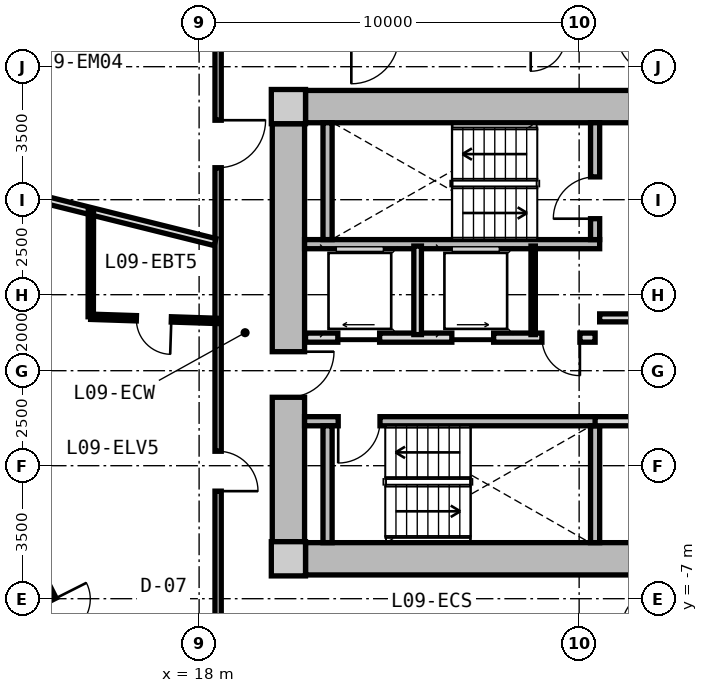
"""IFC4 building model, lengths in metres.
Left out: names, types, materials, properties, quantities, classifications, styles, units other than length and angle.
Written with IfcOpenShell. Run it as: python <this file> out.ifc"""

import sys

from ifc_helpers import new_model, si_unit, direction, frame, frame_2d, origin, origin_2d, place, context, subcontext, project, spatial, rectangle, extrude, source, transform, mapped, element, fill, save


model = new_model("IFC4")
c1 = context("Model", 3, precision=1e-05, world=origin(), true_north=direction((0.0, 1.0)))
c2 = subcontext(c1, "Body", "Model", "MODEL_VIEW")
j1 = project(units=[si_unit("LENGTHUNIT", "METRE"), si_unit("PLANEANGLEUNIT", "RADIAN")], contexts=[c1])
p1 = place(None, origin())
s1 = spatial("IfcSite", under=j1, at=p1, CompositionType="ELEMENT")
p2 = place(p1, origin())
s2 = spatial("IfcBuilding", under=s1, at=p2, CompositionType="ELEMENT")
p3 = place(p2, frame((0.0, 0.0, 33.8)))
s3 = spatial("IfcBuildingStorey", under=s2, at=p3, CompositionType="ELEMENT", Elevation=33.8)
m1 = source(origin(), c2, "Body", "SweptSolid", [
    extrude(rectangle(XDim=0.9, YDim=0.9, at=origin_2d()), origin(), (0.0, 0.0, 1.0), 3.05),
])
for number, where, z_axis, x_axis in (
    (1, (20.35, -5.95, 0.0), (0.0, 0.0, 1.0), (1.0, 0.0, 0.0)),
    (2, (20.35, 5.95, 0.0), (0.0, 0.0, 1.0), (1.0, 0.0, 0.0)),
):
    element("IfcColumn", number, at=place(p3, frame(where, z_axis=z_axis, x_axis=x_axis)), inside=s3, PredefinedType="COLUMN", context=c2, shape_type="MappedRepresentation", body=[
        mapped(m1, transform((0.0, 0.0, 0.0), x_axis=(1.0, 0.0, 0.0), y_axis=(0.0, 1.0, 0.0), z_axis=(0.0, 0.0, 1.0), scale=1.0)),
    ])
m2 = source(origin(), c2, "Body", "SweptSolid", [
    extrude(rectangle(XDim=14.4, YDim=0.85, at=frame_2d((7.2, 0.0))), origin(), (0.0, 0.0, 1.0), 2.79),
])
for number, where, z_axis, x_axis in (
    (3, (20.8, 5.95, 0.0), (0.0, 0.0, 1.0), (1.0, 0.0, 0.0)),
    (4, (35.2, -5.95, 0.0), (0.0, 0.0, 1.0), (-1.0, 0.0, 0.0)),
):
    element("IfcWall", number, at=place(p3, frame(where, z_axis=z_axis, x_axis=x_axis)), inside=s3, PredefinedType="SHEAR", context=c2, shape_type="MappedRepresentation", body=[
        mapped(m2, transform((0.0, 0.0, 0.0), x_axis=(1.0, 0.0, 0.0), y_axis=(0.0, 1.0, 0.0), z_axis=(0.0, 0.0, 1.0), scale=1.0)),
    ])
m3 = source(origin(), c2, "Body", "SweptSolid", [
    extrude(rectangle(XDim=11.0, YDim=0.85, at=frame_2d((5.5, 0.0))), origin(), (0.0, 0.0, 1.0), 2.79),
])
p4 = place(p3, frame((20.35, -5.5, 0.0), z_axis=(0.0, 0.0, 1.0), x_axis=(0.0, 1.0, 0.0)))
e5 = element("IfcWall", 5, at=p4, inside=s3, PredefinedType="SHEAR", context=c2, shape_type="MappedRepresentation", body=[
    mapped(m3, transform((0.0, 0.0, 0.0), x_axis=(1.0, 0.0, 0.0), y_axis=(0.0, 1.0, 0.0), z_axis=(0.0, 0.0, 1.0), scale=1.0)),
])
p5 = place(p4, frame((3.8, 0.0, 0.0)))
e6 = element("IfcOpeningElement", 6, at=p5, cuts=e5, PredefinedType="OPENING", context=c2, shape_type="SweptSolid", body=[
    extrude(rectangle(XDim=1.2, YDim=2.15, at=frame_2d((0.6, 1.075))), frame((0.0, 0.435, 0.0), z_axis=(0.0, -1.0, 0.0), x_axis=(1.0, 0.0, 0.0)), (0.0, 0.0, 1.0), 0.87),
])
m4 = source(origin(), c2, "Body", "SweptSolid", [
    extrude(rectangle(XDim=7.765, YDim=0.24, at=frame_2d((3.883, 0.0))), origin(), (0.0, 0.0, 1.0), 2.79),
])
p6 = place(p3, frame((20.775, 2.33, 0.0), z_axis=(0.0, 0.0, 1.0), x_axis=(1.0, 0.0, 0.0)))
e7 = element("IfcWall", 7, at=p6, inside=s3, PredefinedType="PARTITIONING", context=c2, shape_type="MappedRepresentation", body=[
    mapped(m4, transform((0.0, 0.0, 0.0), x_axis=(1.0, 0.0, 0.0), y_axis=(0.0, 1.0, 0.0), z_axis=(0.0, 0.0, 1.0), scale=1.0)),
])
m5 = source(origin(), c2, "Body", "SweptSolid", [
    extrude(rectangle(XDim=3.075, YDim=0.24, at=frame_2d((1.538, 0.0))), origin(), (0.0, 0.0, 1.0), 2.79),
])
p7 = place(p3, frame((21.38, 2.45, 0.0), z_axis=(0.0, 0.0, 1.0), x_axis=(0.0, 1.0, 0.0)))
e8 = element("IfcWall", 8, at=p7, inside=s3, PredefinedType="PARTITIONING", context=c2, shape_type="MappedRepresentation", body=[
    mapped(m5, transform((0.0, 0.0, 0.0), x_axis=(1.0, 0.0, 0.0), y_axis=(0.0, 1.0, 0.0), z_axis=(0.0, 0.0, 1.0), scale=1.0)),
])
p8 = place(p3, frame((28.42, 2.45, 0.0), z_axis=(0.0, 0.0, 1.0), x_axis=(0.0, 1.0, 0.0)))
e9 = element("IfcWall", 9, at=p8, inside=s3, PredefinedType="PARTITIONING", context=c2, shape_type="MappedRepresentation", body=[
    mapped(m5, transform((0.0, 0.0, 0.0), x_axis=(1.0, 0.0, 0.0), y_axis=(0.0, 1.0, 0.0), z_axis=(0.0, 0.0, 1.0), scale=1.0)),
])
p9 = place(p8, frame((0.55, 0.0, 0.0)))
e10 = element("IfcOpeningElement", 10, at=p9, cuts=e9, PredefinedType="OPENING", context=c2, shape_type="SweptSolid", body=[
    extrude(rectangle(XDim=1.1, YDim=2.15, at=frame_2d((0.55, 1.075))), frame((0.0, 0.13, 0.0), z_axis=(0.0, -1.0, 0.0), x_axis=(1.0, 0.0, 0.0)), (0.0, 0.0, 1.0), 0.26),
])
p10 = place(p3, frame((20.775, -2.33, 0.0), z_axis=(0.0, 0.0, 1.0), x_axis=(1.0, 0.0, 0.0)))
e11 = element("IfcWall", 11, at=p10, inside=s3, PredefinedType="PARTITIONING", context=c2, shape_type="MappedRepresentation", body=[
    mapped(m4, transform((0.0, 0.0, 0.0), x_axis=(1.0, 0.0, 0.0), y_axis=(0.0, 1.0, 0.0), z_axis=(0.0, 0.0, 1.0), scale=1.0)),
])
p11 = place(p10, frame((0.885, 0.0, 0.0)))
e12 = element("IfcOpeningElement", 12, at=p11, cuts=e11, PredefinedType="OPENING", context=c2, shape_type="SweptSolid", body=[
    extrude(rectangle(XDim=1.1, YDim=2.15, at=frame_2d((0.55, 1.075))), frame((0.0, 0.13, 0.0), z_axis=(0.0, -1.0, 0.0), x_axis=(1.0, 0.0, 0.0)), (0.0, 0.0, 1.0), 0.26),
])
for number, where, z_axis, x_axis in (
    (13, (21.38, -5.525, 0.0), (0.0, 0.0, 1.0), (0.0, 1.0, 0.0)),
    (14, (28.42, -5.525, 0.0), (0.0, 0.0, 1.0), (0.0, 1.0, 0.0)),
):
    element("IfcWall", number, at=place(p3, frame(where, z_axis=z_axis, x_axis=x_axis)), inside=s3, PredefinedType="PARTITIONING", context=c2, shape_type="MappedRepresentation", body=[
        mapped(m5, transform((0.0, 0.0, 0.0), x_axis=(1.0, 0.0, 0.0), y_axis=(0.0, 1.0, 0.0), z_axis=(0.0, 0.0, 1.0), scale=1.0)),
    ])
m6 = source(origin(), c2, "Body", "SweptSolid", [
    extrude(rectangle(XDim=6.66, YDim=0.21, at=frame_2d((3.33, 0.0))), origin(), (0.0, 0.0, 1.0), 2.775),
])
p12 = place(p3, frame((28.54, 0.39, 0.0), z_axis=(0.0, 0.0, 1.0), x_axis=(1.0, 0.0, 0.0)))
e15 = element("IfcWall", 15, at=p12, inside=s3, PredefinedType="PARTITIONING", context=c2, shape_type="MappedRepresentation", body=[
    mapped(m6, transform((0.0, 0.0, 0.0), x_axis=(1.0, 0.0, 0.0), y_axis=(0.0, 1.0, 0.0), z_axis=(0.0, 0.0, 1.0), scale=1.0)),
])
p13 = place(p12, frame((1.0, 0.0, 0.0)))
e16 = element("IfcOpeningElement", 16, at=p13, cuts=e15, PredefinedType="OPENING", context=c2, shape_type="SweptSolid", body=[
    extrude(rectangle(XDim=1.2, YDim=2.15, at=frame_2d((0.6, 1.075))), frame((0.0, 0.115, 0.0), z_axis=(0.0, -1.0, 0.0), x_axis=(1.0, 0.0, 0.0)), (0.0, 0.0, 1.0), 0.23),
])
m7 = source(origin(), c2, "Body", "SweptSolid", [
    extrude(rectangle(XDim=7.62, YDim=0.24, at=frame_2d((3.81, 0.0))), origin(), (0.0, 0.0, 1.0), 2.775),
])
p14 = place(p3, frame((20.8, -0.13, 0.0), z_axis=(0.0, 0.0, 1.0), x_axis=(1.0, 0.0, 0.0)))
e17 = element("IfcWall", 17, at=p14, inside=s3, PredefinedType="PARTITIONING", context=c2, shape_type="MappedRepresentation", body=[
    mapped(m7, transform((0.0, 0.0, 0.0), x_axis=(1.0, 0.0, 0.0), y_axis=(0.0, 1.0, 0.0), z_axis=(0.0, 0.0, 1.0), scale=1.0)),
])
p15 = place(p14, frame((6.22, 0.0, 0.0)))
e18 = element("IfcOpeningElement", 18, at=p15, cuts=e17, PredefinedType="OPENING", context=c2, shape_type="SweptSolid", body=[
    extrude(rectangle(XDim=1.0, YDim=2.1, at=frame_2d((0.5, 1.05))), frame((0.0, 0.13, 0.0), z_axis=(0.0, -1.0, 0.0), x_axis=(1.0, 0.0, 0.0)), (0.0, 0.0, 1.0), 0.26),
])
p16 = place(p14, frame((0.85, 0.0, 0.0)))
e19 = element("IfcOpeningElement", 19, at=p16, cuts=e17, PredefinedType="OPENING", context=c2, shape_type="SweptSolid", body=[
    extrude(rectangle(XDim=1.1, YDim=2.2, at=frame_2d((0.55, 1.1))), frame((0.0, 0.13, 0.0), z_axis=(0.0, -1.0, 0.0), x_axis=(1.0, 0.0, 0.0)), (0.0, 0.0, 1.0), 0.26),
])
p17 = place(p14, frame((3.85, 0.0, 0.0)))
e20 = element("IfcOpeningElement", 20, at=p17, cuts=e17, PredefinedType="OPENING", context=c2, shape_type="SweptSolid", body=[
    extrude(rectangle(XDim=1.1, YDim=2.2, at=frame_2d((0.55, 1.1))), frame((0.0, 0.13, 0.0), z_axis=(0.0, -1.0, 0.0), x_axis=(1.0, 0.0, 0.0)), (0.0, 0.0, 1.0), 0.26),
])
m8 = source(origin(), c2, "Body", "SweptSolid", [
    extrude(rectangle(XDim=2.33, YDim=0.115, at=frame_2d((1.165, 0.0))), origin(), (0.0, 0.0, 1.0), 2.775),
])
p18 = place(p3, frame((26.79, -0.05, 0.0), z_axis=(0.0, 0.0, 1.0), x_axis=(0.0, 1.0, 0.0)))
e21 = element("IfcWall", 21, at=p18, inside=s3, PredefinedType="PARTITIONING", context=c2, shape_type="MappedRepresentation", body=[
    mapped(m8, transform((0.0, 0.0, 0.0), x_axis=(1.0, 0.0, 0.0), y_axis=(0.0, 1.0, 0.0), z_axis=(0.0, 0.0, 1.0), scale=1.0)),
])
m9 = source(origin(), c2, "Body", "SweptSolid", [
    extrude(rectangle(XDim=2.33, YDim=0.2, at=frame_2d((1.165, 0.0))), origin(), (0.0, 0.0, 1.0), 2.775),
])
p19 = place(p3, frame((23.75, -0.05, 0.0), z_axis=(0.0, 0.0, 1.0), x_axis=(0.0, 1.0, 0.0)))
e22 = element("IfcWall", 22, at=p19, inside=s3, PredefinedType="PARTITIONING", context=c2, shape_type="MappedRepresentation", body=[
    mapped(m9, transform((0.0, 0.0, 0.0), x_axis=(1.0, 0.0, 0.0), y_axis=(0.0, 1.0, 0.0), z_axis=(0.0, 0.0, 1.0), scale=1.0)),
])
m10 = source(origin(), c2, "Body", "SweptSolid", [
    extrude(rectangle(XDim=4.13, YDim=0.24, at=frame_2d((2.065, 0.0))), origin(), (0.0, 0.0, 1.0), 2.775),
])
p20 = place(p3, frame((28.42, -2.33, 0.0), z_axis=(0.0, 0.0, 1.0), x_axis=(1.0, 0.0, 0.0)))
e23 = element("IfcWall", 23, at=p20, inside=s3, PredefinedType="PARTITIONING", context=c2, shape_type="MappedRepresentation", body=[
    mapped(m10, transform((0.0, 0.0, 0.0), x_axis=(1.0, 0.0, 0.0), y_axis=(0.0, 1.0, 0.0), z_axis=(0.0, 0.0, 1.0), scale=1.0)),
])
m11 = source(origin(), c2, "Body", "SweptSolid", [
    extrude(rectangle(XDim=15.6, YDim=0.165, at=frame_2d((7.8, 0.0))), origin(), (0.0, 0.0, 1.0), 2.775),
])
p21 = place(p3, frame((18.5, -7.8, 0.0), z_axis=(0.0, 0.0, 1.0), x_axis=(0.0, 1.0, 0.0)))
e24 = element("IfcWall", 24, at=p21, inside=s3, PredefinedType="PARTITIONING", context=c2, shape_type="MappedRepresentation", body=[
    mapped(m11, transform((0.0, 0.0, 0.0), x_axis=(1.0, 0.0, 0.0), y_axis=(0.0, 1.0, 0.0), z_axis=(0.0, 0.0, 1.0), scale=1.0)),
])
p22 = place(p21, frame((12.141, 0.0, 0.0)))
e25 = element("IfcOpeningElement", 25, at=p22, cuts=e24, PredefinedType="OPENING", context=c2, shape_type="SweptSolid", body=[
    extrude(rectangle(XDim=1.25, YDim=2.2, at=frame_2d((0.625, 1.1))), frame((0.0, 0.093, 0.0), z_axis=(0.0, -1.0, 0.0), x_axis=(1.0, 0.0, 0.0)), (0.0, 0.0, 1.0), 0.185),
])
p23 = place(p21, frame((3.63, 0.0, 0.0)))
e26 = element("IfcOpeningElement", 26, at=p23, cuts=e24, PredefinedType="OPENING", context=c2, shape_type="SweptSolid", body=[
    extrude(rectangle(XDim=1.05, YDim=2.15, at=frame_2d((0.525, 1.075))), frame((0.0, 0.093, 0.0), z_axis=(0.0, -1.0, 0.0), x_axis=(1.0, 0.0, 0.0)), (0.0, 0.0, 1.0), 0.185),
])
m12 = source(origin(), c2, "Body", "SweptSolid", [
    extrude(rectangle(XDim=9.737, YDim=0.19, at=frame_2d((4.869, 0.0))), origin(), (0.0, 0.0, 1.0), 2.225),
])
p24 = place(p3, frame((18.42, 2.385, 0.0), z_axis=(0.0, 0.0, 1.0), x_axis=(-0.970392716238, 0.241532557375, 0.0)))
e27 = element("IfcWall", 27, at=p24, inside=s3, PredefinedType="PARTITIONING", context=c2, shape_type="MappedRepresentation", body=[
    mapped(m12, transform((0.0, 0.0, 0.0), x_axis=(1.0, 0.0, 0.0), y_axis=(0.0, 1.0, 0.0), z_axis=(0.0, 0.0, 1.0), scale=1.0)),
])
m13 = source(origin(), c2, "Body", "SweptSolid", [
    extrude(rectangle(XDim=8.018, YDim=0.115, at=frame_2d((4.009, 0.0))), origin(), (0.0, 0.0, 1.0), 2.775),
])
p25 = place(p3, frame((12.596, -3.854, 0.0), z_axis=(0.0, 0.0, 1.0), x_axis=(0.450134355233, -0.89296084026, 0.0)))
e28 = element("IfcWall", 28, at=p25, inside=s3, PredefinedType="PARTITIONING", context=c2, shape_type="MappedRepresentation", body=[
    mapped(m13, transform((0.0, 0.0, 0.0), x_axis=(1.0, 0.0, 0.0), y_axis=(0.0, 1.0, 0.0), z_axis=(0.0, 0.0, 1.0), scale=1.0)),
])
p26 = place(p25, frame((3.534, 0.0, 0.0)))
e29 = element("IfcOpeningElement", 29, at=p26, cuts=e28, PredefinedType="OPENING", context=c2, shape_type="SweptSolid", body=[
    extrude(rectangle(XDim=0.95, YDim=2.1, at=frame_2d((0.475, 1.05))), frame((0.0, 0.067, 0.0), z_axis=(0.0, -1.0, 0.0), x_axis=(1.0, 0.0, 0.0)), (0.0, 0.0, 1.0), 0.135),
])
m14 = source(origin(), c2, "Body", "SweptSolid", [
    extrude(rectangle(XDim=3.323, YDim=0.14, at=frame_2d((1.662, 0.0))), origin(), (0.0, 0.0, 1.0), 2.775),
])
p27 = place(p3, frame((18.47, 0.311, 0.0), z_axis=(0.0, 0.0, 1.0), x_axis=(-0.999467979553, 0.032615300817, 0.0)))
e30 = element("IfcWall", 30, at=p27, inside=s3, PredefinedType="PARTITIONING", context=c2, shape_type="MappedRepresentation", body=[
    mapped(m14, transform((0.0, 0.0, 0.0), x_axis=(1.0, 0.0, 0.0), y_axis=(0.0, 1.0, 0.0), z_axis=(0.0, 0.0, 1.0), scale=1.0)),
])
p28 = place(p27, frame((1.202, 0.0, 0.0)))
e31 = element("IfcOpeningElement", 31, at=p28, cuts=e30, PredefinedType="OPENING", context=c2, shape_type="SweptSolid", body=[
    extrude(rectangle(XDim=0.92, YDim=2.1, at=frame_2d((0.46, 1.05))), frame((0.0, 0.08, 0.0), z_axis=(0.0, -1.0, 0.0), x_axis=(1.0, 0.0, 0.0)), (0.0, 0.0, 1.0), 0.16),
])
m15 = source(origin(), c2, "Body", "SweptSolid", [
    extrude(rectangle(XDim=2.795, YDim=0.14, at=frame_2d((1.397, 0.0))), origin(), (0.0, 0.0, 1.0), 2.775),
])
p29 = place(p3, frame((15.148, 0.419, 0.0), z_axis=(0.0, 0.0, 1.0), x_axis=(0.001659531299, 0.999998622977, 0.0)))
e32 = element("IfcWall", 32, at=p29, inside=s3, PredefinedType="PARTITIONING", context=c2, shape_type="MappedRepresentation", body=[
    mapped(m15, transform((0.0, 0.0, 0.0), x_axis=(1.0, 0.0, 0.0), y_axis=(0.0, 1.0, 0.0), z_axis=(0.0, 0.0, 1.0), scale=1.0)),
])
m16 = source(origin(), c2, "Body", "SweptSolid", [
    extrude(rectangle(XDim=1.1, YDim=2.15, at=frame_2d((0.55, 1.075))), frame((0.0, 0.025, 0.0), z_axis=(0.0, -1.0, 0.0), x_axis=(1.0, 0.0, 0.0)), (0.0, 0.0, 1.0), 0.05),
])
p30 = place(p9, origin())
e33 = element("IfcDoor", 33, at=p30, inside=s3, OperationType="SINGLE_SWING_LEFT", PredefinedType="DOOR", context=c2, shape_type="MappedRepresentation", body=[
    mapped(m16, transform((0.0, 0.0, 0.0), x_axis=(1.0, 0.0, 0.0), y_axis=(0.0, 1.0, 0.0), z_axis=(0.0, 0.0, 1.0), scale=1.0)),
])
fill(e10, e33)
p31 = place(p11, frame((1.1, 0.0, 0.0), z_axis=(0.0, 0.0, 1.0), x_axis=(-1.0, 0.0, 0.0)))
e34 = element("IfcDoor", 34, at=p31, inside=s3, OperationType="SINGLE_SWING_RIGHT", PredefinedType="DOOR", context=c2, shape_type="MappedRepresentation", body=[
    mapped(m16, transform((0.0, 0.0, 0.0), x_axis=(1.0, 0.0, 0.0), y_axis=(0.0, 1.0, 0.0), z_axis=(0.0, 0.0, 1.0), scale=1.0)),
])
fill(e12, e34)
m17 = source(origin(), c2, "Body", "SweptSolid", [
    extrude(rectangle(XDim=1.2, YDim=2.15, at=frame_2d((0.6, 1.075))), frame((0.0, 0.025, 0.0), z_axis=(0.0, -1.0, 0.0), x_axis=(1.0, 0.0, 0.0)), (0.0, 0.0, 1.0), 0.05),
])
p32 = place(p5, frame((1.2, 0.0, 0.0), z_axis=(0.0, 0.0, 1.0), x_axis=(-1.0, 0.0, 0.0)))
e35 = element("IfcDoor", 35, at=p32, inside=s3, OperationType="SINGLE_SWING_LEFT", PredefinedType="DOOR", context=c2, shape_type="MappedRepresentation", body=[
    mapped(m17, transform((0.0, 0.0, 0.0), x_axis=(1.0, 0.0, 0.0), y_axis=(0.0, 1.0, 0.0), z_axis=(0.0, 0.0, 1.0), scale=1.0)),
])
fill(e6, e35)
m18 = source(origin(), c2, "Body", "SweptSolid", [
    extrude(rectangle(XDim=1.0, YDim=2.1, at=frame_2d((0.5, 1.05))), frame((0.0, 0.025, 0.0), z_axis=(0.0, -1.0, 0.0), x_axis=(1.0, 0.0, 0.0)), (0.0, 0.0, 1.0), 0.05),
])
p33 = place(p15, frame((1.0, 0.0, 0.0), z_axis=(0.0, 0.0, 1.0), x_axis=(-1.0, 0.0, 0.0)))
e36 = element("IfcDoor", 36, at=p33, inside=s3, OperationType="SINGLE_SWING_LEFT", PredefinedType="DOOR", context=c2, shape_type="MappedRepresentation", body=[
    mapped(m18, transform((0.0, 0.0, 0.0), x_axis=(1.0, 0.0, 0.0), y_axis=(0.0, 1.0, 0.0), z_axis=(0.0, 0.0, 1.0), scale=1.0)),
])
fill(e18, e36)
m19 = source(origin(), c2, "Body", "SweptSolid", [
    extrude(rectangle(XDim=1.1, YDim=2.2, at=frame_2d((0.55, 1.1))), frame((0.0, 0.025, 0.0), z_axis=(0.0, -1.0, 0.0), x_axis=(1.0, 0.0, 0.0)), (0.0, 0.0, 1.0), 0.05),
])
p34 = place(p16, origin())
e37 = element("IfcDoor", 37, at=p34, inside=s3, OperationType="SLIDING_TO_LEFT", PredefinedType="DOOR", context=c2, shape_type="MappedRepresentation", body=[
    mapped(m19, transform((0.0, 0.0, 0.0), x_axis=(1.0, 0.0, 0.0), y_axis=(0.0, 1.0, 0.0), z_axis=(0.0, 0.0, 1.0), scale=1.0)),
])
fill(e19, e37)
p35 = place(p17, origin())
e38 = element("IfcDoor", 38, at=p35, inside=s3, OperationType="SLIDING_TO_RIGHT", PredefinedType="DOOR", context=c2, shape_type="MappedRepresentation", body=[
    mapped(m19, transform((0.0, 0.0, 0.0), x_axis=(1.0, 0.0, 0.0), y_axis=(0.0, 1.0, 0.0), z_axis=(0.0, 0.0, 1.0), scale=1.0)),
])
fill(e20, e38)
m20 = source(origin(), c2, "Body", "SweptSolid", [
    extrude(rectangle(XDim=1.25, YDim=2.2, at=frame_2d((0.625, 1.1))), frame((0.0, 0.025, 0.0), z_axis=(0.0, -1.0, 0.0), x_axis=(1.0, 0.0, 0.0)), (0.0, 0.0, 1.0), 0.05),
])
p36 = place(p22, frame((1.25, 0.0, 0.0), z_axis=(0.0, 0.0, 1.0), x_axis=(-1.0, 0.0, 0.0)))
e39 = element("IfcDoor", 39, at=p36, inside=s3, OperationType="SINGLE_SWING_LEFT", PredefinedType="DOOR", context=c2, shape_type="MappedRepresentation", body=[
    mapped(m20, transform((0.0, 0.0, 0.0), x_axis=(1.0, 0.0, 0.0), y_axis=(0.0, 1.0, 0.0), z_axis=(0.0, 0.0, 1.0), scale=1.0)),
])
fill(e25, e39)
m21 = source(origin(), c2, "Body", "SweptSolid", [
    extrude(rectangle(XDim=1.05, YDim=2.15, at=frame_2d((0.525, 1.075))), frame((0.0, 0.025, 0.0), z_axis=(0.0, -1.0, 0.0), x_axis=(1.0, 0.0, 0.0)), (0.0, 0.0, 1.0), 0.05),
])
p37 = place(p23, frame((1.05, 0.0, 0.0), z_axis=(0.0, 0.0, 1.0), x_axis=(-1.0, 0.0, 0.0)))
e40 = element("IfcDoor", 40, at=p37, inside=s3, OperationType="SINGLE_SWING_RIGHT", PredefinedType="DOOR", context=c2, shape_type="MappedRepresentation", body=[
    mapped(m21, transform((0.0, 0.0, 0.0), x_axis=(1.0, 0.0, 0.0), y_axis=(0.0, 1.0, 0.0), z_axis=(0.0, 0.0, 1.0), scale=1.0)),
])
fill(e26, e40)
m22 = source(origin(), c2, "Body", "SweptSolid", [
    extrude(rectangle(XDim=0.92, YDim=2.1, at=frame_2d((0.46, 1.05))), frame((0.0, 0.025, 0.0), z_axis=(0.0, -1.0, 0.0), x_axis=(1.0, 0.0, 0.0)), (0.0, 0.0, 1.0), 0.05),
])
p38 = place(p28, origin())
e41 = element("IfcDoor", 41, at=p38, inside=s3, OperationType="SINGLE_SWING_LEFT", PredefinedType="DOOR", context=c2, shape_type="MappedRepresentation", body=[
    mapped(m22, transform((0.0, 0.0, 0.0), x_axis=(1.0, 0.0, 0.0), y_axis=(0.0, 1.0, 0.0), z_axis=(0.0, 0.0, 1.0), scale=1.0)),
])
fill(e31, e41)
m23 = source(origin(), c2, "Body", "SweptSolid", [
    extrude(rectangle(XDim=0.95, YDim=2.1, at=frame_2d((0.475, 1.05))), frame((0.0, 0.025, 0.0), z_axis=(0.0, -1.0, 0.0), x_axis=(1.0, 0.0, 0.0)), (0.0, 0.0, 1.0), 0.05),
])
p39 = place(p26, origin())
e42 = element("IfcDoor", 42, at=p39, inside=s3, OperationType="SINGLE_SWING_LEFT", PredefinedType="DOOR", context=c2, shape_type="MappedRepresentation", body=[
    mapped(m23, transform((0.0, 0.0, 0.0), x_axis=(1.0, 0.0, 0.0), y_axis=(0.0, 1.0, 0.0), z_axis=(0.0, 0.0, 1.0), scale=1.0)),
])
fill(e29, e42)
save(model, sys.argv[1])
